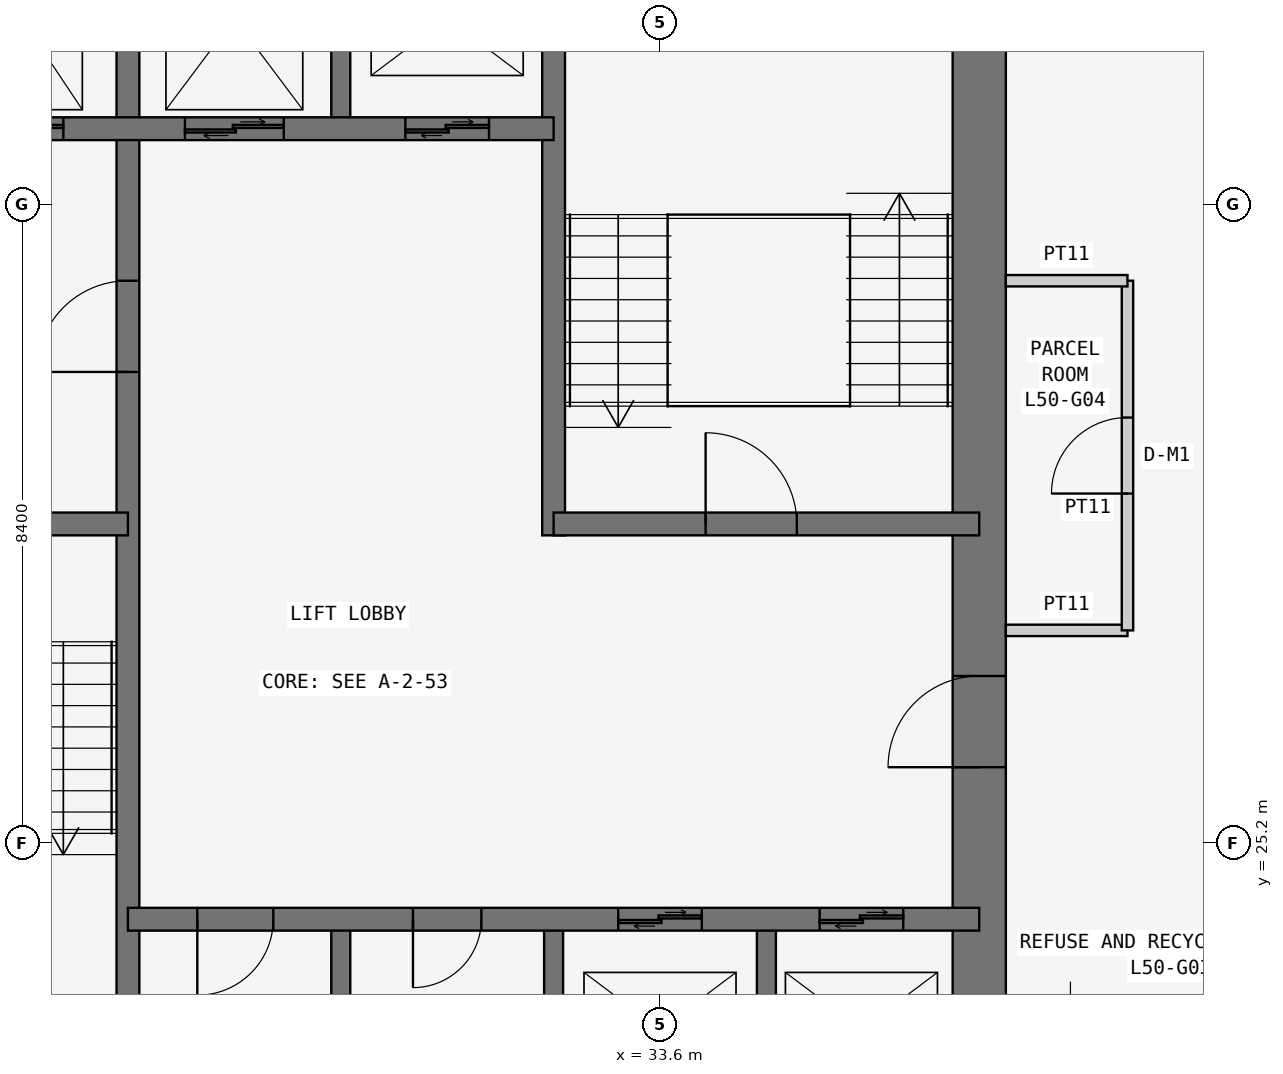
"""IFC4 building model, lengths in metres.
Left out: names, types, materials, properties, quantities, classifications, styles, units other than length and angle.
Written with IfcOpenShell. Run it as: python <this file> out.ifc"""

import sys

from ifc_helpers import new_model, si_unit, direction, frame, frame_2d, origin, place, context, subcontext, project, spatial, rectangle, extrude, element, fill, save


model = new_model("IFC4")
c1 = context("Model", 3, precision=1e-05, world=origin(), true_north=direction((0.0, 1.0)))
c2 = subcontext(c1, "Body", "Model", "MODEL_VIEW")
j1 = project(units=[si_unit("LENGTHUNIT", "METRE"), si_unit("PLANEANGLEUNIT", "RADIAN")], contexts=[c1])
p1 = place(None, origin())
s1 = spatial("IfcSite", under=j1, at=p1, CompositionType="ELEMENT")
p2 = place(p1, origin())
s2 = spatial("IfcBuilding", under=s1, at=p2, CompositionType="ELEMENT")
p3 = place(p2, frame((0.0, 0.0, 194.1)))
s3 = spatial("IfcBuildingStorey", under=s2, at=p3, CompositionType="ELEMENT", Elevation=194.1)
p4 = place(p3, frame((37.8, 21.0, 0.0), z_axis=(0.0, 0.0, 1.0), x_axis=(0.0, 1.0, 0.0)))
e1 = element("IfcWall", 1, at=p4, inside=s3, PredefinedType="SHEAR", context=c2, shape_type="SweptSolid", body=[
    extrude(rectangle(XDim=17.15, YDim=0.7, at=frame_2d((8.575, 0.0))), origin(), (0.0, 0.0, 1.0), 3.6),
])
p5 = place(p4, frame((5.2, 0.0, 0.0)))
e2 = element("IfcOpeningElement", 2, at=p5, cuts=e1, PredefinedType="OPENING", context=c2, shape_type="SweptSolid", body=[
    extrude(rectangle(XDim=1.2, YDim=2.1, at=frame_2d((0.6, 1.05))), frame((0.0, 0.36, 0.0), z_axis=(0.0, -1.0, 0.0), x_axis=(1.0, 0.0, 0.0)), (0.0, 0.0, 1.0), 0.72),
])
p6 = place(p3, frame((26.6, 21.0, 0.0), z_axis=(0.0, 0.0, 1.0), x_axis=(0.0, 1.0, 0.0)))
e3 = element("IfcWall", 3, at=p6, inside=s3, PredefinedType="SHEAR", context=c2, shape_type="SweptSolid", body=[
    extrude(rectangle(XDim=16.8, YDim=0.3, at=frame_2d((8.4, 0.0))), origin(), (0.0, 0.0, 1.0), 3.6),
])
p7 = place(p6, frame((10.4, 0.0, 0.0)))
e4 = element("IfcOpeningElement", 4, at=p7, cuts=e3, PredefinedType="OPENING", context=c2, shape_type="SweptSolid", body=[
    extrude(rectangle(XDim=1.2, YDim=2.1, at=frame_2d((0.6, 1.05))), frame((0.0, 0.16, 0.0), z_axis=(0.0, -1.0, 0.0), x_axis=(1.0, 0.0, 0.0)), (0.0, 0.0, 1.0), 0.32),
])
p8 = place(p3, frame((21.0, 29.4, 0.0), z_axis=(0.0, 0.0, 1.0), x_axis=(1.0, 0.0, 0.0)))
e5 = element("IfcWall", 5, at=p8, inside=s3, PredefinedType="SHEAR", context=c2, shape_type="SweptSolid", body=[
    extrude(rectangle(XDim=5.6, YDim=0.3, at=frame_2d((2.8, 0.0))), origin(), (0.0, 0.0, 1.0), 3.6),
])
p9 = place(p8, frame((2.3, 0.0, 0.0)))
e6 = element("IfcOpeningElement", 6, at=p9, cuts=e5, PredefinedType="OPENING", context=c2, shape_type="SweptSolid", body=[
    extrude(rectangle(XDim=1.2, YDim=2.1, at=frame_2d((0.6, 1.05))), frame((0.0, 0.16, 0.0), z_axis=(0.0, -1.0, 0.0), x_axis=(1.0, 0.0, 0.0)), (0.0, 0.0, 1.0), 0.32),
])
p10 = place(p3, frame((21.0, 34.6, 0.0), z_axis=(0.0, 0.0, 1.0), x_axis=(1.0, 0.0, 0.0)))
e7 = element("IfcWall", 7, at=p10, inside=s3, PredefinedType="SHEAR", context=c2, shape_type="SweptSolid", body=[
    extrude(rectangle(XDim=11.2, YDim=0.3, at=frame_2d((5.6, 0.0))), origin(), (0.0, 0.0, 1.0), 3.6),
])
p11 = place(p10, frame((9.25, 0.0, 0.0)))
e8 = element("IfcOpeningElement", 8, at=p11, cuts=e7, PredefinedType="OPENING", context=c2, shape_type="SweptSolid", body=[
    extrude(rectangle(XDim=1.1, YDim=2.1, at=frame_2d((0.55, 1.05))), frame((0.0, 0.16, 0.0), z_axis=(0.0, -1.0, 0.0), x_axis=(1.0, 0.0, 0.0)), (0.0, 0.0, 1.0), 0.32),
])
p12 = place(p10, frame((1.0, 0.0, 0.0)))
e9 = element("IfcOpeningElement", 9, at=p12, cuts=e7, PredefinedType="OPENING", context=c2, shape_type="SweptSolid", body=[
    extrude(rectangle(XDim=1.1, YDim=2.1, at=frame_2d((0.55, 1.05))), frame((0.0, 0.16, 0.0), z_axis=(0.0, -1.0, 0.0), x_axis=(1.0, 0.0, 0.0)), (0.0, 0.0, 1.0), 0.32),
])
p13 = place(p10, frame((3.65, 0.0, 0.0)))
e10 = element("IfcOpeningElement", 10, at=p13, cuts=e7, PredefinedType="OPENING", context=c2, shape_type="SweptSolid", body=[
    extrude(rectangle(XDim=1.1, YDim=2.1, at=frame_2d((0.55, 1.05))), frame((0.0, 0.16, 0.0), z_axis=(0.0, -1.0, 0.0), x_axis=(1.0, 0.0, 0.0)), (0.0, 0.0, 1.0), 0.32),
])
p14 = place(p10, frame((6.35, 0.0, 0.0)))
e11 = element("IfcOpeningElement", 11, at=p14, cuts=e7, PredefinedType="OPENING", context=c2, shape_type="SweptSolid", body=[
    extrude(rectangle(XDim=1.3, YDim=2.1, at=frame_2d((0.65, 1.05))), frame((0.0, 0.16, 0.0), z_axis=(0.0, -1.0, 0.0), x_axis=(1.0, 0.0, 0.0)), (0.0, 0.0, 1.0), 0.32),
])
p15 = place(p3, frame((26.6, 24.2, 0.0), z_axis=(0.0, 0.0, 1.0), x_axis=(1.0, 0.0, 0.0)))
e12 = element("IfcWall", 12, at=p15, inside=s3, PredefinedType="SHEAR", context=c2, shape_type="SweptSolid", body=[
    extrude(rectangle(XDim=11.2, YDim=0.3, at=frame_2d((5.6, 0.0))), origin(), (0.0, 0.0, 1.0), 3.6),
])
p16 = place(p15, frame((0.913, 0.0, 0.0)))
e13 = element("IfcOpeningElement", 13, at=p16, cuts=e12, PredefinedType="OPENING", context=c2, shape_type="SweptSolid", body=[
    extrude(rectangle(XDim=1.0, YDim=2.1, at=frame_2d((0.5, 1.05))), frame((0.0, 0.16, 0.0), z_axis=(0.0, -1.0, 0.0), x_axis=(1.0, 0.0, 0.0)), (0.0, 0.0, 1.0), 0.32),
])
p17 = place(p15, frame((3.75, 0.0, 0.0)))
e14 = element("IfcOpeningElement", 14, at=p17, cuts=e12, PredefinedType="OPENING", context=c2, shape_type="SweptSolid", body=[
    extrude(rectangle(XDim=0.9, YDim=2.1, at=frame_2d((0.45, 1.05))), frame((0.0, 0.16, 0.0), z_axis=(0.0, -1.0, 0.0), x_axis=(1.0, 0.0, 0.0)), (0.0, 0.0, 1.0), 0.32),
])
p18 = place(p15, frame((6.45, 0.0, 0.0)))
e15 = element("IfcOpeningElement", 15, at=p18, cuts=e12, PredefinedType="OPENING", context=c2, shape_type="SweptSolid", body=[
    extrude(rectangle(XDim=1.1, YDim=2.1, at=frame_2d((0.55, 1.05))), frame((0.0, 0.16, 0.0), z_axis=(0.0, -1.0, 0.0), x_axis=(1.0, 0.0, 0.0)), (0.0, 0.0, 1.0), 0.32),
])
p19 = place(p15, frame((9.1, 0.0, 0.0)))
e16 = element("IfcOpeningElement", 16, at=p19, cuts=e12, PredefinedType="OPENING", context=c2, shape_type="SweptSolid", body=[
    extrude(rectangle(XDim=1.1, YDim=2.1, at=frame_2d((0.55, 1.05))), frame((0.0, 0.16, 0.0), z_axis=(0.0, -1.0, 0.0), x_axis=(1.0, 0.0, 0.0)), (0.0, 0.0, 1.0), 0.32),
])
p20 = place(p3, frame((32.2, 29.25, 0.0), z_axis=(0.0, 0.0, 1.0), x_axis=(0.0, 1.0, 0.0)))
e17 = element("IfcWall", 17, at=p20, inside=s3, PredefinedType="SHEAR", context=c2, shape_type="SweptSolid", body=[
    extrude(rectangle(XDim=8.55, YDim=0.3, at=frame_2d((4.275, 0.0))), origin(), (0.0, 0.0, 1.0), 3.6),
])
p21 = place(p3, frame((32.2, 29.4, 0.0), z_axis=(0.0, 0.0, 1.0), x_axis=(1.0, 0.0, 0.0)))
e18 = element("IfcWall", 18, at=p21, inside=s3, PredefinedType="SHEAR", context=c2, shape_type="SweptSolid", body=[
    extrude(rectangle(XDim=5.6, YDim=0.3, at=frame_2d((2.8, 0.0))), origin(), (0.0, 0.0, 1.0), 3.6),
])
p22 = place(p21, frame((2.0, 0.0, 0.0)))
e19 = element("IfcOpeningElement", 19, at=p22, cuts=e18, PredefinedType="OPENING", context=c2, shape_type="SweptSolid", body=[
    extrude(rectangle(XDim=1.2, YDim=2.1, at=frame_2d((0.6, 1.05))), frame((0.0, 0.16, 0.0), z_axis=(0.0, -1.0, 0.0), x_axis=(1.0, 0.0, 0.0)), (0.0, 0.0, 1.0), 0.32),
])
for number, where, z_axis, x_axis in (
    (20, (29.4, 21.0, 0.0), (0.0, 0.0, 1.0), (0.0, 1.0, 0.0)),
    (21, (32.2, 21.0, 0.0), (0.0, 0.0, 1.0), (0.0, 1.0, 0.0)),
    (22, (35.0, 21.0, 0.0), (0.0, 0.0, 1.0), (0.0, 1.0, 0.0)),
    (23, (29.4, 34.6, 0.0), (0.0, 0.0, 1.0), (0.0, 1.0, 0.0)),
):
    element("IfcWall", number, at=place(p3, frame(where, z_axis=z_axis, x_axis=x_axis)), inside=s3, PredefinedType="SHEAR", context=c2, shape_type="SweptSolid", body=[
        extrude(rectangle(XDim=3.2, YDim=0.25, at=frame_2d((1.6, 0.0))), origin(), (0.0, 0.0, 1.0), 3.6),
    ])
p23 = place(p3, frame((38.15, 28.0, 0.0), z_axis=(0.0, 0.0, 1.0), x_axis=(1.0, 0.0, 0.0)))
e24 = element("IfcWall", 24, at=p23, inside=s3, PredefinedType="PARTITIONING", context=c2, shape_type="SweptSolid", body=[
    extrude(rectangle(XDim=1.6, YDim=0.15, at=frame_2d((0.8, 0.0))), origin(), (0.0, 0.0, 1.0), 3.45),
])
p24 = place(p3, frame((39.75, 28.0, 0.0), z_axis=(0.0, 0.0, 1.0), x_axis=(0.0, 1.0, 0.0)))
e25 = element("IfcWall", 25, at=p24, inside=s3, PredefinedType="PARTITIONING", context=c2, shape_type="SweptSolid", body=[
    extrude(rectangle(XDim=4.6, YDim=0.15, at=frame_2d((2.3, 0.0))), origin(), (0.0, 0.0, 1.0), 3.45),
])
p25 = place(p24, frame((1.8, 0.0, 0.0)))
e26 = element("IfcOpeningElement", 26, at=p25, cuts=e25, PredefinedType="OPENING", context=c2, shape_type="SweptSolid", body=[
    extrude(rectangle(XDim=1.0, YDim=2.1, at=frame_2d((0.5, 1.05))), frame((0.0, 0.085, 0.0), z_axis=(0.0, -1.0, 0.0), x_axis=(1.0, 0.0, 0.0)), (0.0, 0.0, 1.0), 0.17),
])
p26 = place(p3, frame((39.75, 32.6, 0.0), z_axis=(0.0, 0.0, 1.0), x_axis=(-1.0, 0.0, 0.0)))
e27 = element("IfcWall", 27, at=p26, inside=s3, PredefinedType="PARTITIONING", context=c2, shape_type="SweptSolid", body=[
    extrude(rectangle(XDim=1.6, YDim=0.15, at=frame_2d((0.8, 0.0))), origin(), (0.0, 0.0, 1.0), 3.45),
])
p27 = place(p25, origin())
e28 = element("IfcDoor", 28, at=p27, inside=s3, OperationType="SINGLE_SWING_LEFT", PredefinedType="DOOR", context=c2, shape_type="SweptSolid", body=[
    extrude(rectangle(XDim=1.0, YDim=2.1, at=frame_2d((0.5, 1.05))), frame((0.0, 0.025, 0.0), z_axis=(0.0, -1.0, 0.0), x_axis=(1.0, 0.0, 0.0)), (0.0, 0.0, 1.0), 0.05),
])
fill(e26, e28)
p28 = place(p7, origin())
e29 = element("IfcDoor", 29, at=p28, inside=s3, OperationType="SINGLE_SWING_LEFT", PredefinedType="DOOR", context=c2, shape_type="SweptSolid", body=[
    extrude(rectangle(XDim=1.2, YDim=2.1, at=frame_2d((0.6, 1.05))), frame((0.0, 0.025, 0.0), z_axis=(0.0, -1.0, 0.0), x_axis=(1.0, 0.0, 0.0)), (0.0, 0.0, 1.0), 0.05),
])
fill(e4, e29)
p29 = place(p5, origin())
e30 = element("IfcDoor", 30, at=p29, inside=s3, OperationType="SINGLE_SWING_LEFT", PredefinedType="DOOR", context=c2, shape_type="SweptSolid", body=[
    extrude(rectangle(XDim=1.2, YDim=2.1, at=frame_2d((0.6, 1.05))), frame((0.0, 0.025, 0.0), z_axis=(0.0, -1.0, 0.0), x_axis=(1.0, 0.0, 0.0)), (0.0, 0.0, 1.0), 0.05),
])
fill(e2, e30)
p30 = place(p22, origin())
e31 = element("IfcDoor", 31, at=p30, inside=s3, OperationType="SINGLE_SWING_LEFT", PredefinedType="DOOR", context=c2, shape_type="SweptSolid", body=[
    extrude(rectangle(XDim=1.2, YDim=2.1, at=frame_2d((0.6, 1.05))), frame((0.0, 0.025, 0.0), z_axis=(0.0, -1.0, 0.0), x_axis=(1.0, 0.0, 0.0)), (0.0, 0.0, 1.0), 0.05),
])
fill(e19, e31)
p31 = place(p16, frame((1.0, 0.0, 0.0), z_axis=(0.0, 0.0, 1.0), x_axis=(-1.0, 0.0, 0.0)))
e32 = element("IfcDoor", 32, at=p31, inside=s3, OperationType="SINGLE_SWING_RIGHT", PredefinedType="DOOR", context=c2, shape_type="SweptSolid", body=[
    extrude(rectangle(XDim=1.0, YDim=2.1, at=frame_2d((0.5, 1.05))), frame((0.0, 0.025, 0.0), z_axis=(0.0, -1.0, 0.0), x_axis=(1.0, 0.0, 0.0)), (0.0, 0.0, 1.0), 0.05),
])
fill(e13, e32)
p32 = place(p17, frame((0.9, 0.0, 0.0), z_axis=(0.0, 0.0, 1.0), x_axis=(-1.0, 0.0, 0.0)))
e33 = element("IfcDoor", 33, at=p32, inside=s3, OperationType="SINGLE_SWING_RIGHT", PredefinedType="DOOR", context=c2, shape_type="SweptSolid", body=[
    extrude(rectangle(XDim=0.9, YDim=2.1, at=frame_2d((0.45, 1.05))), frame((0.0, 0.025, 0.0), z_axis=(0.0, -1.0, 0.0), x_axis=(1.0, 0.0, 0.0)), (0.0, 0.0, 1.0), 0.05),
])
fill(e14, e33)
p33 = place(p18, origin())
e34 = element("IfcDoor", 34, at=p33, inside=s3, OperationType="DOUBLE_DOOR_SLIDING", PredefinedType="DOOR", context=c2, shape_type="SweptSolid", body=[
    extrude(rectangle(XDim=1.1, YDim=2.1, at=frame_2d((0.55, 1.05))), frame((0.0, 0.025, 0.0), z_axis=(0.0, -1.0, 0.0), x_axis=(1.0, 0.0, 0.0)), (0.0, 0.0, 1.0), 0.05),
])
fill(e15, e34)
p34 = place(p19, origin())
e35 = element("IfcDoor", 35, at=p34, inside=s3, OperationType="DOUBLE_DOOR_SLIDING", PredefinedType="DOOR", context=c2, shape_type="SweptSolid", body=[
    extrude(rectangle(XDim=1.1, YDim=2.1, at=frame_2d((0.55, 1.05))), frame((0.0, 0.025, 0.0), z_axis=(0.0, -1.0, 0.0), x_axis=(1.0, 0.0, 0.0)), (0.0, 0.0, 1.0), 0.05),
])
fill(e16, e35)
p35 = place(p11, origin())
e36 = element("IfcDoor", 36, at=p35, inside=s3, OperationType="DOUBLE_DOOR_SLIDING", PredefinedType="DOOR", context=c2, shape_type="SweptSolid", body=[
    extrude(rectangle(XDim=1.1, YDim=2.1, at=frame_2d((0.55, 1.05))), frame((0.0, 0.025, 0.0), z_axis=(0.0, -1.0, 0.0), x_axis=(1.0, 0.0, 0.0)), (0.0, 0.0, 1.0), 0.05),
])
fill(e8, e36)
p36 = place(p13, origin())
e37 = element("IfcDoor", 37, at=p36, inside=s3, OperationType="DOUBLE_DOOR_SLIDING", PredefinedType="DOOR", context=c2, shape_type="SweptSolid", body=[
    extrude(rectangle(XDim=1.1, YDim=2.1, at=frame_2d((0.55, 1.05))), frame((0.0, 0.025, 0.0), z_axis=(0.0, -1.0, 0.0), x_axis=(1.0, 0.0, 0.0)), (0.0, 0.0, 1.0), 0.05),
])
fill(e10, e37)
p37 = place(p14, origin())
e38 = element("IfcDoor", 38, at=p37, inside=s3, OperationType="DOUBLE_DOOR_SLIDING", PredefinedType="DOOR", context=c2, shape_type="SweptSolid", body=[
    extrude(rectangle(XDim=1.3, YDim=2.1, at=frame_2d((0.65, 1.05))), frame((0.0, 0.025, 0.0), z_axis=(0.0, -1.0, 0.0), x_axis=(1.0, 0.0, 0.0)), (0.0, 0.0, 1.0), 0.05),
])
fill(e11, e38)
save(model, sys.argv[1])
